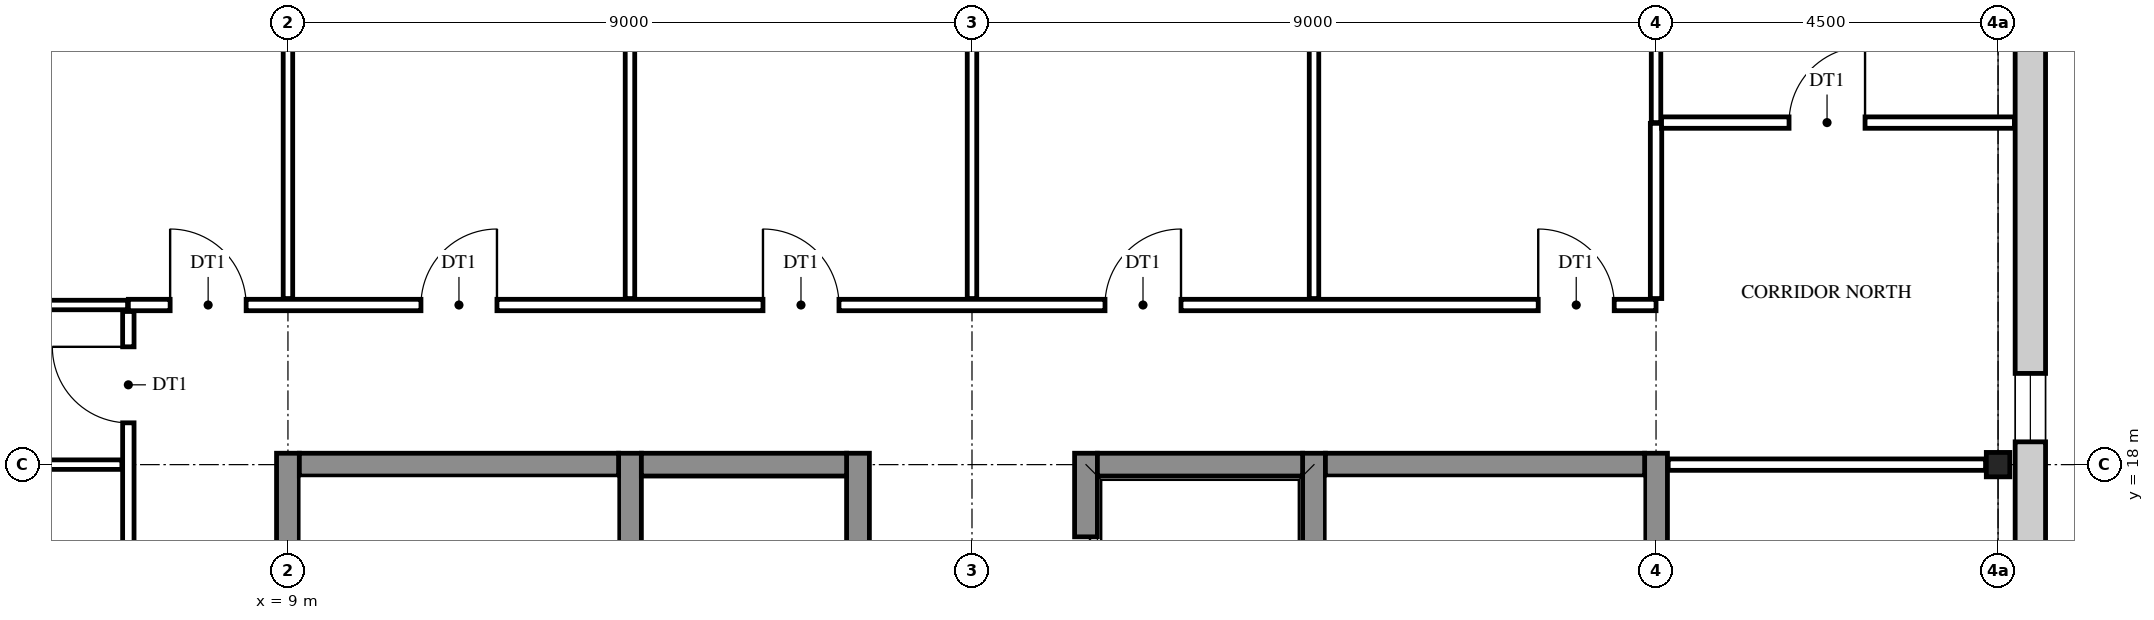
"""IFC4 building model, lengths in metres.
Left out: names, types, materials, properties, quantities, classifications, styles, units other than length and angle.
Written with IfcOpenShell. Run it as: python <this file> out.ifc"""

import sys

from ifc_helpers import new_model, si_unit, direction, frame, frame_2d, origin, origin_2d, place, context, subcontext, project, spatial, rectangle, i_section, extrude, element, fill, save


model = new_model("IFC4")
c1 = context("Model", 3, precision=1e-05, world=origin(), true_north=direction((0.0, 1.0)))
c2 = subcontext(c1, "Body", "Model", "MODEL_VIEW")
j1 = project(units=[si_unit("LENGTHUNIT", "METRE"), si_unit("PLANEANGLEUNIT", "RADIAN")], contexts=[c1])
p1 = place(None, origin())
s1 = spatial("IfcSite", under=j1, at=p1, CompositionType="ELEMENT")
p2 = place(p1, origin())
s2 = spatial("IfcBuilding", under=s1, at=p2, CompositionType="ELEMENT")
p3 = place(p2, frame((0.0, 0.0, 57.0)))
s3 = spatial("IfcBuildingStorey", under=s2, at=p3, CompositionType="ELEMENT", Elevation=57.0)
p4 = place(p3, frame((31.5, 18.0, 0.0), z_axis=(0.0, 0.0, 1.0), x_axis=(1.0, 0.0, 0.0)))
e1 = element("IfcColumn", 1, at=p4, inside=s3, PredefinedType="COLUMN", context=c2, shape_type="SweptSolid", body=[
    extrude(i_section(OverallWidth=0.309, OverallDepth=0.321, WebThickness=0.014, FlangeThickness=0.022, FilletRadius=0.017, at=origin_2d()), origin(), (0.0, 0.0, 1.0), 4.2),
])
for number, where, z_axis, x_axis in (
    (2, (9.0, 8.85, 0.0), (0.0, 0.0, 1.0), (0.0, 1.0, 0.0)),
    (3, (13.5, 8.85, 0.0), (0.0, 0.0, 1.0), (0.0, 1.0, 0.0)),
):
    element("IfcWall", number, at=place(p3, frame(where, z_axis=z_axis, x_axis=x_axis)), inside=s3, PredefinedType="SHEAR", context=c2, shape_type="SweptSolid", body=[
        extrude(rectangle(XDim=9.3, YDim=0.3, at=frame_2d((4.65, 0.0))), origin(), (0.0, 0.0, 1.0), 4.2),
    ])
p5 = place(p3, frame((16.5, 8.85, 0.0), z_axis=(0.0, 0.0, 1.0), x_axis=(0.0, 1.0, 0.0)))
e4 = element("IfcWall", 4, at=p5, inside=s3, PredefinedType="SHEAR", context=c2, shape_type="SweptSolid", body=[
    extrude(rectangle(XDim=9.3, YDim=0.3, at=frame_2d((4.65, 0.0))), origin(), (0.0, 0.0, 1.0), 4.2),
])
p6 = place(p5, frame((1.1, 0.0, 0.0)))
e5 = element("IfcOpeningElement", 5, at=p6, cuts=e4, PredefinedType="OPENING", context=c2, shape_type="SweptSolid", body=[
    extrude(rectangle(XDim=1.1, YDim=2.1, at=frame_2d((0.55, 1.05))), frame((0.0, 0.16, 0.0), z_axis=(0.0, -1.0, 0.0), x_axis=(1.0, 0.0, 0.0)), (0.0, 0.0, 1.0), 0.32),
])
p7 = place(p5, frame((4.1, 0.0, 0.0)))
e6 = element("IfcOpeningElement", 6, at=p7, cuts=e4, PredefinedType="OPENING", context=c2, shape_type="SweptSolid", body=[
    extrude(rectangle(XDim=1.1, YDim=2.1, at=frame_2d((0.55, 1.05))), frame((0.0, 0.16, 0.0), z_axis=(0.0, -1.0, 0.0), x_axis=(1.0, 0.0, 0.0)), (0.0, 0.0, 1.0), 0.32),
])
p8 = place(p3, frame((19.5, 8.85, 0.0), z_axis=(0.0, 0.0, 1.0), x_axis=(0.0, 1.0, 0.0)))
e7 = element("IfcWall", 7, at=p8, inside=s3, PredefinedType="SHEAR", context=c2, shape_type="SweptSolid", body=[
    extrude(rectangle(XDim=9.3, YDim=0.3, at=frame_2d((4.65, 0.0))), origin(), (0.0, 0.0, 1.0), 4.2),
])
p9 = place(p8, frame((3.95, 0.0, 0.0)))
e8 = element("IfcOpeningElement", 8, at=p9, cuts=e7, PredefinedType="OPENING", context=c2, shape_type="SweptSolid", body=[
    extrude(rectangle(XDim=1.4, YDim=2.1, at=frame_2d((0.7, 1.05))), frame((0.0, 0.16, 0.0), z_axis=(0.0, -1.0, 0.0), x_axis=(1.0, 0.0, 0.0)), (0.0, 0.0, 1.0), 0.32),
])
p10 = place(p8, frame((7.1, 0.0, 0.0)))
e9 = element("IfcOpeningElement", 9, at=p10, cuts=e7, PredefinedType="OPENING", context=c2, shape_type="SweptSolid", body=[
    extrude(rectangle(XDim=1.1, YDim=2.1, at=frame_2d((0.55, 1.05))), frame((0.0, 0.16, 0.0), z_axis=(0.0, -1.0, 0.0), x_axis=(1.0, 0.0, 0.0)), (0.0, 0.0, 1.0), 0.32),
])
for number, where, z_axis, x_axis in (
    (10, (22.5, 8.85, 0.0), (0.0, 0.0, 1.0), (0.0, 1.0, 0.0)),
    (11, (27.0, 8.85, 0.0), (0.0, 0.0, 1.0), (0.0, 1.0, 0.0)),
):
    element("IfcWall", number, at=place(p3, frame(where, z_axis=z_axis, x_axis=x_axis)), inside=s3, PredefinedType="SHEAR", context=c2, shape_type="SweptSolid", body=[
        extrude(rectangle(XDim=9.3, YDim=0.3, at=frame_2d((4.65, 0.0))), origin(), (0.0, 0.0, 1.0), 4.2),
    ])
p11 = place(p3, frame((9.15, 18.0, 0.0), z_axis=(0.0, 0.0, 1.0), x_axis=(1.0, 0.0, 0.0)))
e12 = element("IfcWall", 12, at=p11, inside=s3, PredefinedType="SHEAR", context=c2, shape_type="SweptSolid", body=[
    extrude(rectangle(XDim=4.2, YDim=0.3, at=frame_2d((2.1, 0.0))), origin(), (0.0, 0.0, 1.0), 4.2),
])
for number, where, z_axis, x_axis in (
    (13, (13.65, 18.0, 0.0), (0.0, 0.0, 1.0), (1.0, 0.0, 0.0)),
    (14, (19.65, 18.0, 0.0), (0.0, 0.0, 1.0), (1.0, 0.0, 0.0)),
):
    element("IfcWall", number, at=place(p3, frame(where, z_axis=z_axis, x_axis=x_axis)), inside=s3, PredefinedType="SHEAR", context=c2, shape_type="SweptSolid", body=[
        extrude(rectangle(XDim=2.7, YDim=0.3, at=frame_2d((1.35, 0.0))), origin(), (0.0, 0.0, 1.0), 4.2),
    ])
p12 = place(p3, frame((22.65, 18.0, 0.0), z_axis=(0.0, 0.0, 1.0), x_axis=(1.0, 0.0, 0.0)))
e15 = element("IfcWall", 15, at=p12, inside=s3, PredefinedType="SHEAR", context=c2, shape_type="SweptSolid", body=[
    extrude(rectangle(XDim=4.2, YDim=0.3, at=frame_2d((2.1, 0.0))), origin(), (0.0, 0.0, 1.0), 4.2),
])
p13 = place(p3, frame((31.925, 27.225, 0.0), z_axis=(0.0, 0.0, 1.0), x_axis=(0.0, -1.0, 0.0)))
e16 = element("IfcWall", 16, at=p13, inside=s3, PredefinedType="STANDARD", context=c2, shape_type="SweptSolid", body=[
    extrude(rectangle(XDim=27.45, YDim=0.4, at=frame_2d((13.725, 0.0))), origin(), (0.0, 0.0, 1.0), 4.2),
])
p14 = place(p13, frame((26.025, 0.0, 0.9)))
e17 = element("IfcOpeningElement", 17, at=p14, cuts=e16, PredefinedType="OPENING", context=c2, shape_type="SweptSolid", body=[
    extrude(rectangle(XDim=0.9, YDim=2.0, at=frame_2d((0.45, 1.0))), frame((0.0, 0.21, 0.0), z_axis=(0.0, -1.0, 0.0), x_axis=(1.0, 0.0, 0.0)), (0.0, 0.0, 1.0), 0.42),
])
p15 = place(p13, frame((18.525, 0.0, 0.9)))
e18 = element("IfcOpeningElement", 18, at=p15, cuts=e16, PredefinedType="OPENING", context=c2, shape_type="SweptSolid", body=[
    extrude(rectangle(XDim=0.9, YDim=2.0, at=frame_2d((0.45, 1.0))), frame((0.0, 0.21, 0.0), z_axis=(0.0, -1.0, 0.0), x_axis=(1.0, 0.0, 0.0)), (0.0, 0.0, 1.0), 0.42),
])
p16 = place(p13, frame((15.675, 0.0, 1.6)))
e19 = element("IfcOpeningElement", 19, at=p16, cuts=e16, PredefinedType="OPENING", context=c2, shape_type="SweptSolid", body=[
    extrude(rectangle(XDim=0.6, YDim=0.9, at=frame_2d((0.3, 0.45))), frame((0.0, 0.21, 0.0), z_axis=(0.0, -1.0, 0.0), x_axis=(1.0, 0.0, 0.0)), (0.0, 0.0, 1.0), 0.42),
])
p17 = place(p13, frame((11.175, 0.0, 1.6)))
e20 = element("IfcOpeningElement", 20, at=p17, cuts=e16, PredefinedType="OPENING", context=c2, shape_type="SweptSolid", body=[
    extrude(rectangle(XDim=0.6, YDim=0.9, at=frame_2d((0.3, 0.45))), frame((0.0, 0.21, 0.0), z_axis=(0.0, -1.0, 0.0), x_axis=(1.0, 0.0, 0.0)), (0.0, 0.0, 1.0), 0.42),
])
p18 = place(p13, frame((8.025, 0.0, 0.9)))
e21 = element("IfcOpeningElement", 21, at=p18, cuts=e16, PredefinedType="OPENING", context=c2, shape_type="SweptSolid", body=[
    extrude(rectangle(XDim=0.9, YDim=2.0, at=frame_2d((0.45, 1.0))), frame((0.0, 0.21, 0.0), z_axis=(0.0, -1.0, 0.0), x_axis=(1.0, 0.0, 0.0)), (0.0, 0.0, 1.0), 0.42),
])
p19 = place(p13, frame((0.525, 0.0, 0.9)))
e22 = element("IfcOpeningElement", 22, at=p19, cuts=e16, PredefinedType="OPENING", context=c2, shape_type="SweptSolid", body=[
    extrude(rectangle(XDim=0.9, YDim=2.0, at=frame_2d((0.45, 1.0))), frame((0.0, 0.21, 0.0), z_axis=(0.0, -1.0, 0.0), x_axis=(1.0, 0.0, 0.0)), (0.0, 0.0, 1.0), 0.42),
])
p20 = place(p3, frame((6.9, 6.985, 0.0), z_axis=(0.0, 0.0, 1.0), x_axis=(0.0, 1.0, 0.0)))
e23 = element("IfcWall", 23, at=p20, inside=s3, PredefinedType="PARTITIONING", context=c2, shape_type="SweptSolid", body=[
    extrude(rectangle(XDim=13.03, YDim=0.15, at=frame_2d((6.515, 0.0))), origin(), (0.0, 0.0, 1.0), 3.542),
])
p21 = place(p20, frame((11.565, 0.0, 0.0)))
e24 = element("IfcOpeningElement", 24, at=p21, cuts=e23, PredefinedType="OPENING", context=c2, shape_type="SweptSolid", body=[
    extrude(rectangle(XDim=1.0, YDim=2.1, at=frame_2d((0.5, 1.05))), frame((0.0, 0.085, 0.0), z_axis=(0.0, -1.0, 0.0), x_axis=(1.0, 0.0, 0.0)), (0.0, 0.0, 1.0), 0.17),
])
p22 = place(p20, frame((3.765, 0.0, 0.0)))
e25 = element("IfcOpeningElement", 25, at=p22, cuts=e23, PredefinedType="OPENING", context=c2, shape_type="SweptSolid", body=[
    extrude(rectangle(XDim=1.0, YDim=2.1, at=frame_2d((0.5, 1.05))), frame((0.0, 0.085, 0.0), z_axis=(0.0, -1.0, 0.0), x_axis=(1.0, 0.0, 0.0)), (0.0, 0.0, 1.0), 0.17),
])
p23 = place(p20, frame((8.265, 0.0, 0.0)))
e26 = element("IfcOpeningElement", 26, at=p23, cuts=e23, PredefinedType="OPENING", context=c2, shape_type="SweptSolid", body=[
    extrude(rectangle(XDim=1.0, YDim=2.1, at=frame_2d((0.5, 1.05))), frame((0.0, 0.085, 0.0), z_axis=(0.0, -1.0, 0.0), x_axis=(1.0, 0.0, 0.0)), (0.0, 0.0, 1.0), 0.17),
])
p24 = place(p3, frame((9.0, 20.185, 0.0), z_axis=(0.0, 0.0, 1.0), x_axis=(0.0, 1.0, 0.0)))
e27 = element("IfcWall", 27, at=p24, inside=s3, PredefinedType="PARTITIONING", context=c2, shape_type="SweptSolid", body=[
    extrude(rectangle(XDim=6.645, YDim=0.125, at=frame_2d((3.322, 0.0))), origin(), (0.0, 0.0, 1.0), 3.542),
])
p25 = place(p3, frame((13.5, 20.185, 0.0), z_axis=(0.0, 0.0, 1.0), x_axis=(0.0, 1.0, 0.0)))
e28 = element("IfcWall", 28, at=p25, inside=s3, PredefinedType="PARTITIONING", context=c2, shape_type="SweptSolid", body=[
    extrude(rectangle(XDim=7.041, YDim=0.125, at=frame_2d((3.521, 0.0))), origin(), (0.0, 0.0, 1.0), 3.542),
])
p26 = place(p3, frame((18.0, 20.185, 0.0), z_axis=(0.0, 0.0, 1.0), x_axis=(0.0, 1.0, 0.0)))
e29 = element("IfcWall", 29, at=p26, inside=s3, PredefinedType="PARTITIONING", context=c2, shape_type="SweptSolid", body=[
    extrude(rectangle(XDim=6.645, YDim=0.125, at=frame_2d((3.322, 0.0))), origin(), (0.0, 0.0, 1.0), 3.542),
])
p27 = place(p3, frame((22.5, 20.185, 0.0), z_axis=(0.0, 0.0, 1.0), x_axis=(0.0, 1.0, 0.0)))
e30 = element("IfcWall", 30, at=p27, inside=s3, PredefinedType="PARTITIONING", context=c2, shape_type="SweptSolid", body=[
    extrude(rectangle(XDim=7.041, YDim=0.125, at=frame_2d((3.521, 0.0))), origin(), (0.0, 0.0, 1.0), 3.542),
])
p28 = place(p3, frame((27.0, 20.185, 0.0), z_axis=(0.0, 0.0, 1.0), x_axis=(0.0, 1.0, 0.0)))
e31 = element("IfcWall", 31, at=p28, inside=s3, PredefinedType="PARTITIONING", context=c2, shape_type="SweptSolid", body=[
    extrude(rectangle(XDim=2.305, YDim=0.15, at=frame_2d((1.152, 0.0))), origin(), (0.0, 0.0, 1.0), 3.542),
])
p29 = place(p3, frame((27.0, 22.5, 0.0), z_axis=(0.0, 0.0, 1.0), x_axis=(0.0, 1.0, 0.0)))
e32 = element("IfcWall", 32, at=p29, inside=s3, PredefinedType="PARTITIONING", context=c2, shape_type="SweptSolid", body=[
    extrude(rectangle(XDim=4.33, YDim=0.125, at=frame_2d((2.165, 0.0))), origin(), (0.0, 0.0, 1.0), 3.542),
])
p30 = place(p3, frame((0.165, 18.0, 0.0), z_axis=(0.0, 0.0, 1.0), x_axis=(1.0, 0.0, 0.0)))
e33 = element("IfcWall", 33, at=p30, inside=s3, PredefinedType="PARTITIONING", context=c2, shape_type="SweptSolid", body=[
    extrude(rectangle(XDim=6.65, YDim=0.125, at=frame_2d((3.325, 0.0))), origin(), (0.0, 0.0, 1.0), 3.542),
])
p31 = place(p3, frame((27.16, 18.0, 0.0), z_axis=(0.0, 0.0, 1.0), x_axis=(1.0, 0.0, 0.0)))
e34 = element("IfcWall", 34, at=p31, inside=s3, PredefinedType="PARTITIONING", context=c2, shape_type="SweptSolid", body=[
    extrude(rectangle(XDim=4.176, YDim=0.15, at=frame_2d((2.088, 0.0))), origin(), (0.0, 0.0, 1.0), 3.542),
])
p32 = place(p3, frame((4.573, 20.1, 0.0), z_axis=(0.0, 0.0, 1.0), x_axis=(1.0, 0.0, 0.0)))
e35 = element("IfcWall", 35, at=p32, inside=s3, PredefinedType="PARTITIONING", context=c2, shape_type="SweptSolid", body=[
    extrude(rectangle(XDim=2.317, YDim=0.125, at=frame_2d((1.159, 0.0))), origin(), (0.0, 0.0, 1.0), 3.542),
])
p33 = place(p3, frame((6.9, 20.1, 0.0), z_axis=(0.0, 0.0, 1.0), x_axis=(1.0, 0.0, 0.0)))
e36 = element("IfcWall", 36, at=p33, inside=s3, PredefinedType="PARTITIONING", context=c2, shape_type="SweptSolid", body=[
    extrude(rectangle(XDim=20.1, YDim=0.15, at=frame_2d((10.05, 0.0))), origin(), (0.0, 0.0, 1.0), 3.542),
])
p34 = place(p33, frame((0.55, 0.0, 0.0)))
e37 = element("IfcOpeningElement", 37, at=p34, cuts=e36, PredefinedType="OPENING", context=c2, shape_type="SweptSolid", body=[
    extrude(rectangle(XDim=1.0, YDim=2.1, at=frame_2d((0.5, 1.05))), frame((0.0, 0.085, 0.0), z_axis=(0.0, -1.0, 0.0), x_axis=(1.0, 0.0, 0.0)), (0.0, 0.0, 1.0), 0.17),
])
p35 = place(p33, frame((3.85, 0.0, 0.0)))
e38 = element("IfcOpeningElement", 38, at=p35, cuts=e36, PredefinedType="OPENING", context=c2, shape_type="SweptSolid", body=[
    extrude(rectangle(XDim=1.0, YDim=2.1, at=frame_2d((0.5, 1.05))), frame((0.0, 0.085, 0.0), z_axis=(0.0, -1.0, 0.0), x_axis=(1.0, 0.0, 0.0)), (0.0, 0.0, 1.0), 0.17),
])
p36 = place(p33, frame((8.35, 0.0, 0.0)))
e39 = element("IfcOpeningElement", 39, at=p36, cuts=e36, PredefinedType="OPENING", context=c2, shape_type="SweptSolid", body=[
    extrude(rectangle(XDim=1.0, YDim=2.1, at=frame_2d((0.5, 1.05))), frame((0.0, 0.085, 0.0), z_axis=(0.0, -1.0, 0.0), x_axis=(1.0, 0.0, 0.0)), (0.0, 0.0, 1.0), 0.17),
])
p37 = place(p33, frame((12.85, 0.0, 0.0)))
e40 = element("IfcOpeningElement", 40, at=p37, cuts=e36, PredefinedType="OPENING", context=c2, shape_type="SweptSolid", body=[
    extrude(rectangle(XDim=1.0, YDim=2.1, at=frame_2d((0.5, 1.05))), frame((0.0, 0.085, 0.0), z_axis=(0.0, -1.0, 0.0), x_axis=(1.0, 0.0, 0.0)), (0.0, 0.0, 1.0), 0.17),
])
p38 = place(p33, frame((18.55, 0.0, 0.0)))
e41 = element("IfcOpeningElement", 41, at=p38, cuts=e36, PredefinedType="OPENING", context=c2, shape_type="SweptSolid", body=[
    extrude(rectangle(XDim=1.0, YDim=2.1, at=frame_2d((0.5, 1.05))), frame((0.0, 0.085, 0.0), z_axis=(0.0, -1.0, 0.0), x_axis=(1.0, 0.0, 0.0)), (0.0, 0.0, 1.0), 0.17),
])
p39 = place(p3, frame((27.073, 22.5, 0.0), z_axis=(0.0, 0.0, 1.0), x_axis=(1.0, 0.0, 0.0)))
e42 = element("IfcWall", 42, at=p39, inside=s3, PredefinedType="PARTITIONING", context=c2, shape_type="SweptSolid", body=[
    extrude(rectangle(XDim=4.643, YDim=0.15, at=frame_2d((2.321, 0.0))), origin(), (0.0, 0.0, 1.0), 3.542),
])
p40 = place(p39, frame((1.677, 0.0, 0.0)))
e43 = element("IfcOpeningElement", 43, at=p40, cuts=e42, PredefinedType="OPENING", context=c2, shape_type="SweptSolid", body=[
    extrude(rectangle(XDim=1.0, YDim=2.1, at=frame_2d((0.5, 1.05))), frame((0.0, 0.085, 0.0), z_axis=(0.0, -1.0, 0.0), x_axis=(1.0, 0.0, 0.0)), (0.0, 0.0, 1.0), 0.17),
])
p41 = place(p18, origin())
e44 = element("IfcWindow", 44, at=p41, inside=s3, PartitioningType="SINGLE_PANEL", PredefinedType="WINDOW", context=c2, shape_type="SweptSolid", body=[
    extrude(rectangle(XDim=0.9, YDim=2.0, at=frame_2d((0.45, 1.0))), frame((0.0, 0.03, 0.0), z_axis=(0.0, -1.0, 0.0), x_axis=(1.0, 0.0, 0.0)), (0.0, 0.0, 1.0), 0.06),
])
fill(e21, e44)
p42 = place(p21, origin())
e45 = element("IfcDoor", 45, at=p42, inside=s3, OperationType="SINGLE_SWING_RIGHT", PredefinedType="DOOR", context=c2, shape_type="SweptSolid", body=[
    extrude(rectangle(XDim=1.0, YDim=2.1, at=frame_2d((0.5, 1.05))), frame((0.0, 0.025, 0.0), z_axis=(0.0, -1.0, 0.0), x_axis=(1.0, 0.0, 0.0)), (0.0, 0.0, 1.0), 0.05),
])
fill(e24, e45)
p43 = place(p34, origin())
e46 = element("IfcDoor", 46, at=p43, inside=s3, OperationType="SINGLE_SWING_LEFT", PredefinedType="DOOR", context=c2, shape_type="SweptSolid", body=[
    extrude(rectangle(XDim=1.0, YDim=2.1, at=frame_2d((0.5, 1.05))), frame((0.0, 0.025, 0.0), z_axis=(0.0, -1.0, 0.0), x_axis=(1.0, 0.0, 0.0)), (0.0, 0.0, 1.0), 0.05),
])
fill(e37, e46)
p44 = place(p35, origin())
e47 = element("IfcDoor", 47, at=p44, inside=s3, OperationType="SINGLE_SWING_RIGHT", PredefinedType="DOOR", context=c2, shape_type="SweptSolid", body=[
    extrude(rectangle(XDim=1.0, YDim=2.1, at=frame_2d((0.5, 1.05))), frame((0.0, 0.025, 0.0), z_axis=(0.0, -1.0, 0.0), x_axis=(1.0, 0.0, 0.0)), (0.0, 0.0, 1.0), 0.05),
])
fill(e38, e47)
p45 = place(p36, origin())
e48 = element("IfcDoor", 48, at=p45, inside=s3, OperationType="SINGLE_SWING_LEFT", PredefinedType="DOOR", context=c2, shape_type="SweptSolid", body=[
    extrude(rectangle(XDim=1.0, YDim=2.1, at=frame_2d((0.5, 1.05))), frame((0.0, 0.025, 0.0), z_axis=(0.0, -1.0, 0.0), x_axis=(1.0, 0.0, 0.0)), (0.0, 0.0, 1.0), 0.05),
])
fill(e39, e48)
p46 = place(p37, origin())
e49 = element("IfcDoor", 49, at=p46, inside=s3, OperationType="SINGLE_SWING_RIGHT", PredefinedType="DOOR", context=c2, shape_type="SweptSolid", body=[
    extrude(rectangle(XDim=1.0, YDim=2.1, at=frame_2d((0.5, 1.05))), frame((0.0, 0.025, 0.0), z_axis=(0.0, -1.0, 0.0), x_axis=(1.0, 0.0, 0.0)), (0.0, 0.0, 1.0), 0.05),
])
fill(e40, e49)
p47 = place(p38, origin())
e50 = element("IfcDoor", 50, at=p47, inside=s3, OperationType="SINGLE_SWING_LEFT", PredefinedType="DOOR", context=c2, shape_type="SweptSolid", body=[
    extrude(rectangle(XDim=1.0, YDim=2.1, at=frame_2d((0.5, 1.05))), frame((0.0, 0.025, 0.0), z_axis=(0.0, -1.0, 0.0), x_axis=(1.0, 0.0, 0.0)), (0.0, 0.0, 1.0), 0.05),
])
fill(e41, e50)
p48 = place(p40, origin())
e51 = element("IfcDoor", 51, at=p48, inside=s3, OperationType="SINGLE_SWING_RIGHT", PredefinedType="DOOR", context=c2, shape_type="SweptSolid", body=[
    extrude(rectangle(XDim=1.0, YDim=2.1, at=frame_2d((0.5, 1.05))), frame((0.0, 0.025, 0.0), z_axis=(0.0, -1.0, 0.0), x_axis=(1.0, 0.0, 0.0)), (0.0, 0.0, 1.0), 0.05),
])
fill(e43, e51)
p49 = place(p10, origin())
e52 = element("IfcDoor", 52, at=p49, inside=s3, OperationType="DOUBLE_DOOR_SLIDING", PredefinedType="DOOR", context=c2, shape_type="SweptSolid", body=[
    extrude(rectangle(XDim=1.1, YDim=2.1, at=frame_2d((0.55, 1.05))), frame((0.0, 0.025, 0.0), z_axis=(0.0, -1.0, 0.0), x_axis=(1.0, 0.0, 0.0)), (0.0, 0.0, 1.0), 0.05),
])
fill(e9, e52)
save(model, sys.argv[1])
